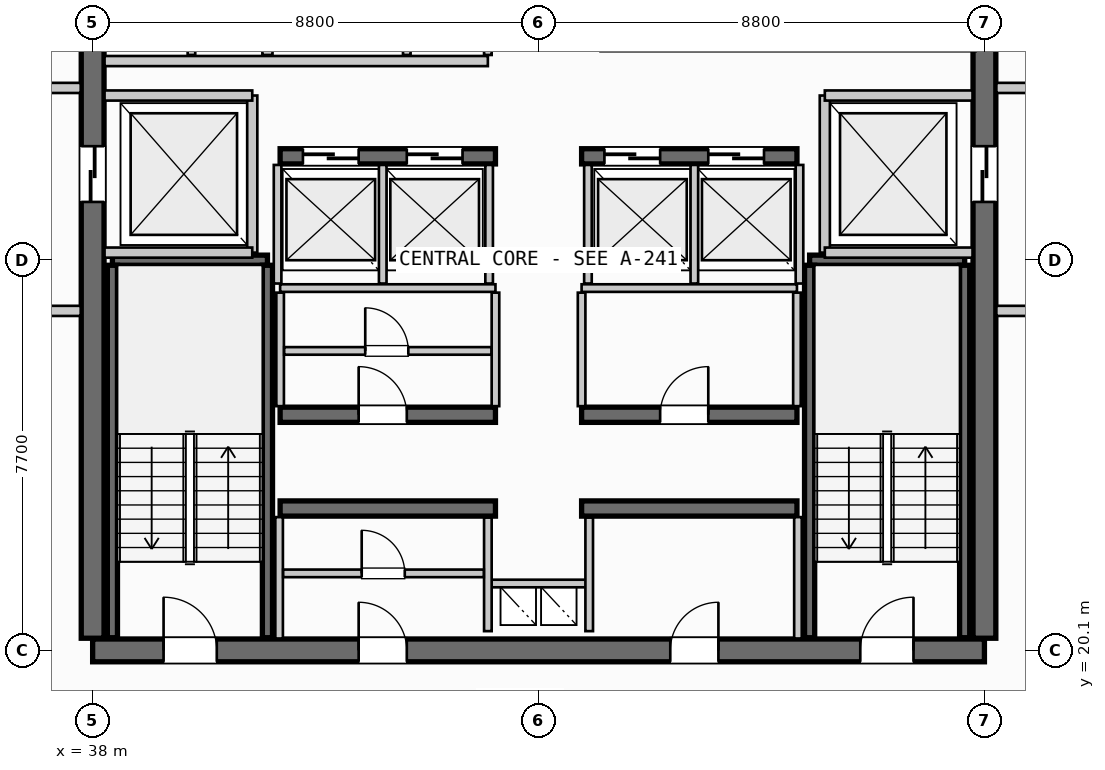
"""IFC4 building model, lengths in metres.
Left out: names, types, materials, properties, quantities, classifications, styles, units other than length and angle.
Written with IfcOpenShell. Run it as: python <this file> out.ifc"""

import sys

from ifc_helpers import new_model, si_unit, direction, frame, frame_2d, origin, place, context, subcontext, project, spatial, rectangle, extrude, source, transform, mapped, element, fill, save


model = new_model("IFC4")
c1 = context("Model", 3, precision=1e-05, world=origin(), true_north=direction((0.0, 1.0)))
c2 = subcontext(c1, "Body", "Model", "MODEL_VIEW")
j1 = project(units=[si_unit("LENGTHUNIT", "METRE"), si_unit("PLANEANGLEUNIT", "RADIAN")], contexts=[c1])
p1 = place(None, origin())
s1 = spatial("IfcSite", under=j1, at=p1, CompositionType="ELEMENT")
p2 = place(p1, origin())
s2 = spatial("IfcBuilding", under=s1, at=p2, CompositionType="ELEMENT")
p3 = place(p2, frame((0.0, 0.0, 293.95)))
s3 = spatial("IfcBuildingStorey", under=s2, at=p3, CompositionType="ELEMENT", Elevation=293.95)
p4 = place(p3, frame((38.0, 20.1, 0.0), z_axis=(0.0, 0.0, 1.0), x_axis=(1.0, 0.0, 0.0)))
e1 = element("IfcWall", 1, at=p4, inside=s3, PredefinedType="SHEAR", context=c2, shape_type="SweptSolid", body=[
    extrude(rectangle(XDim=17.6, YDim=0.45, at=frame_2d((8.8, 0.0))), origin(), (0.0, 0.0, 1.0), 3.21),
])
p5 = place(p4, frame((1.4, 0.0, 0.0)))
e2 = element("IfcOpeningElement", 2, at=p5, cuts=e1, PredefinedType="OPENING", context=c2, shape_type="SweptSolid", body=[
    extrude(rectangle(XDim=1.05, YDim=2.15, at=frame_2d((0.525, 1.075))), frame((0.0, 0.235, 0.0), z_axis=(0.0, -1.0, 0.0), x_axis=(1.0, 0.0, 0.0)), (0.0, 0.0, 1.0), 0.47),
])
p6 = place(p4, frame((15.15, 0.0, 0.0)))
e3 = element("IfcOpeningElement", 3, at=p6, cuts=e1, PredefinedType="OPENING", context=c2, shape_type="SweptSolid", body=[
    extrude(rectangle(XDim=1.05, YDim=2.15, at=frame_2d((0.525, 1.075))), frame((0.0, 0.235, 0.0), z_axis=(0.0, -1.0, 0.0), x_axis=(1.0, 0.0, 0.0)), (0.0, 0.0, 1.0), 0.47),
])
p7 = place(p4, frame((5.25, 0.0, 0.0)))
e4 = element("IfcOpeningElement", 4, at=p7, cuts=e1, PredefinedType="OPENING", context=c2, shape_type="SweptSolid", body=[
    extrude(rectangle(XDim=0.95, YDim=2.15, at=frame_2d((0.475, 1.075))), frame((0.0, 0.235, 0.0), z_axis=(0.0, -1.0, 0.0), x_axis=(1.0, 0.0, 0.0)), (0.0, 0.0, 1.0), 0.47),
])
p8 = place(p4, frame((11.4, 0.0, 0.0)))
e5 = element("IfcOpeningElement", 5, at=p8, cuts=e1, PredefinedType="OPENING", context=c2, shape_type="SweptSolid", body=[
    extrude(rectangle(XDim=0.95, YDim=2.15, at=frame_2d((0.475, 1.075))), frame((0.0, 0.235, 0.0), z_axis=(0.0, -1.0, 0.0), x_axis=(1.0, 0.0, 0.0)), (0.0, 0.0, 1.0), 0.47),
])
p9 = place(p3, frame((38.0, 35.26, 0.0), z_axis=(0.0, 0.0, 1.0), x_axis=(0.0, -1.0, 0.0)))
e6 = element("IfcWall", 6, at=p9, inside=s3, PredefinedType="SHEAR", context=c2, shape_type="SweptSolid", body=[
    extrude(rectangle(XDim=14.92, YDim=0.45, at=frame_2d((7.46, 0.0))), origin(), (0.0, 0.0, 1.0), 3.21),
])
p10 = place(p9, frame((5.21, 0.0, 0.0)))
e7 = element("IfcOpeningElement", 7, at=p10, cuts=e6, PredefinedType="OPENING", context=c2, shape_type="SweptSolid", body=[
    extrude(rectangle(XDim=1.1, YDim=2.2, at=frame_2d((0.55, 1.1))), frame((0.0, 0.235, 0.0), z_axis=(0.0, -1.0, 0.0), x_axis=(1.0, 0.0, 0.0)), (0.0, 0.0, 1.0), 0.47),
])
p11 = place(p3, frame((55.6, 20.34, 0.0), z_axis=(0.0, 0.0, 1.0), x_axis=(0.0, 1.0, 0.0)))
e8 = element("IfcWall", 8, at=p11, inside=s3, PredefinedType="SHEAR", context=c2, shape_type="SweptSolid", body=[
    extrude(rectangle(XDim=14.92, YDim=0.45, at=frame_2d((7.46, 0.0))), origin(), (0.0, 0.0, 1.0), 3.21),
])
p12 = place(p11, frame((12.71, 0.0, 0.0)))
e9 = element("IfcOpeningElement", 9, at=p12, cuts=e8, PredefinedType="OPENING", context=c2, shape_type="SweptSolid", body=[
    extrude(rectangle(XDim=1.05, YDim=2.15, at=frame_2d((0.525, 1.075))), frame((0.0, 0.235, 0.0), z_axis=(0.0, -1.0, 0.0), x_axis=(1.0, 0.0, 0.0)), (0.0, 0.0, 1.0), 0.47),
])
p13 = place(p11, frame((8.61, 0.0, 0.0)))
e10 = element("IfcOpeningElement", 10, at=p13, cuts=e8, PredefinedType="OPENING", context=c2, shape_type="SweptSolid", body=[
    extrude(rectangle(XDim=1.1, YDim=2.2, at=frame_2d((0.55, 1.1))), frame((0.0, 0.235, 0.0), z_axis=(0.0, -1.0, 0.0), x_axis=(1.0, 0.0, 0.0)), (0.0, 0.0, 1.0), 0.47),
])
for number, where, z_axis, x_axis in (
    (11, (41.7, 22.9, 0.0), (0.0, 0.0, 1.0), (1.0, 0.0, 0.0)),
    (12, (47.65, 22.9, 0.0), (0.0, 0.0, 1.0), (1.0, 0.0, 0.0)),
):
    element("IfcWall", number, at=place(p3, frame(where, z_axis=z_axis, x_axis=x_axis)), inside=s3, PredefinedType="SHEAR", context=c2, shape_type="SweptSolid", body=[
        extrude(rectangle(XDim=4.25, YDim=0.3, at=frame_2d((2.125, 0.0))), origin(), (0.0, 0.0, 1.0), 3.21),
    ])
p14 = place(p3, frame((41.7, 24.75, 0.0), z_axis=(0.0, 0.0, 1.0), x_axis=(1.0, 0.0, 0.0)))
e13 = element("IfcWall", 13, at=p14, inside=s3, PredefinedType="SHEAR", context=c2, shape_type="SweptSolid", body=[
    extrude(rectangle(XDim=4.25, YDim=0.3, at=frame_2d((2.125, 0.0))), origin(), (0.0, 0.0, 1.0), 3.21),
])
p15 = place(p14, frame((1.55, 0.0, 0.0)))
e14 = element("IfcOpeningElement", 14, at=p15, cuts=e13, PredefinedType="OPENING", context=c2, shape_type="SweptSolid", body=[
    extrude(rectangle(XDim=0.95, YDim=2.15, at=frame_2d((0.475, 1.075))), frame((0.0, 0.16, 0.0), z_axis=(0.0, -1.0, 0.0), x_axis=(1.0, 0.0, 0.0)), (0.0, 0.0, 1.0), 0.32),
])
p16 = place(p3, frame((47.65, 24.75, 0.0), z_axis=(0.0, 0.0, 1.0), x_axis=(1.0, 0.0, 0.0)))
e15 = element("IfcWall", 15, at=p16, inside=s3, PredefinedType="SHEAR", context=c2, shape_type="SweptSolid", body=[
    extrude(rectangle(XDim=4.25, YDim=0.3, at=frame_2d((2.125, 0.0))), origin(), (0.0, 0.0, 1.0), 3.21),
])
p17 = place(p16, frame((1.55, 0.0, 0.0)))
e16 = element("IfcOpeningElement", 16, at=p17, cuts=e15, PredefinedType="OPENING", context=c2, shape_type="SweptSolid", body=[
    extrude(rectangle(XDim=0.95, YDim=2.15, at=frame_2d((0.475, 1.075))), frame((0.0, 0.16, 0.0), z_axis=(0.0, -1.0, 0.0), x_axis=(1.0, 0.0, 0.0)), (0.0, 0.0, 1.0), 0.32),
])
p18 = place(p3, frame((41.7, 29.85, 0.0), z_axis=(0.0, 0.0, 1.0), x_axis=(1.0, 0.0, 0.0)))
e17 = element("IfcWall", 17, at=p18, inside=s3, PredefinedType="SHEAR", context=c2, shape_type="SweptSolid", body=[
    extrude(rectangle(XDim=4.25, YDim=0.3, at=frame_2d((2.125, 0.0))), origin(), (0.0, 0.0, 1.0), 3.21),
])
p19 = place(p18, frame((0.45, 0.0, 0.0)))
e18 = element("IfcOpeningElement", 18, at=p19, cuts=e17, PredefinedType="OPENING", context=c2, shape_type="SweptSolid", body=[
    extrude(rectangle(XDim=1.1, YDim=2.2, at=frame_2d((0.55, 1.1))), frame((0.0, 0.16, 0.0), z_axis=(0.0, -1.0, 0.0), x_axis=(1.0, 0.0, 0.0)), (0.0, 0.0, 1.0), 0.32),
])
p20 = place(p18, frame((2.5, 0.0, 0.0)))
e19 = element("IfcOpeningElement", 19, at=p20, cuts=e17, PredefinedType="OPENING", context=c2, shape_type="SweptSolid", body=[
    extrude(rectangle(XDim=1.1, YDim=2.2, at=frame_2d((0.55, 1.1))), frame((0.0, 0.16, 0.0), z_axis=(0.0, -1.0, 0.0), x_axis=(1.0, 0.0, 0.0)), (0.0, 0.0, 1.0), 0.32),
])
p21 = place(p3, frame((47.65, 29.85, 0.0), z_axis=(0.0, 0.0, 1.0), x_axis=(1.0, 0.0, 0.0)))
e20 = element("IfcWall", 20, at=p21, inside=s3, PredefinedType="SHEAR", context=c2, shape_type="SweptSolid", body=[
    extrude(rectangle(XDim=4.25, YDim=0.3, at=frame_2d((2.125, 0.0))), origin(), (0.0, 0.0, 1.0), 3.21),
])
p22 = place(p21, frame((0.45, 0.0, 0.0)))
e21 = element("IfcOpeningElement", 21, at=p22, cuts=e20, PredefinedType="OPENING", context=c2, shape_type="SweptSolid", body=[
    extrude(rectangle(XDim=1.1, YDim=2.2, at=frame_2d((0.55, 1.1))), frame((0.0, 0.16, 0.0), z_axis=(0.0, -1.0, 0.0), x_axis=(1.0, 0.0, 0.0)), (0.0, 0.0, 1.0), 0.32),
])
p23 = place(p21, frame((2.5, 0.0, 0.0)))
e22 = element("IfcOpeningElement", 22, at=p23, cuts=e20, PredefinedType="OPENING", context=c2, shape_type="SweptSolid", body=[
    extrude(rectangle(XDim=1.1, YDim=2.2, at=frame_2d((0.55, 1.1))), frame((0.0, 0.16, 0.0), z_axis=(0.0, -1.0, 0.0), x_axis=(1.0, 0.0, 0.0)), (0.0, 0.0, 1.0), 0.32),
])
p24 = place(p3, frame((38.39, 27.8, 0.0), z_axis=(0.0, 0.0, 1.0), x_axis=(1.0, 0.0, 0.0)))
e23 = element("IfcWall", 23, at=p24, inside=s3, PredefinedType="SHEAR", context=c2, shape_type="SweptSolid", body=[
    extrude(rectangle(XDim=3.06, YDim=0.2, at=frame_2d((1.53, 0.0))), origin(), (0.0, 0.0, 1.0), 3.21),
])
for number, where, z_axis, x_axis in (
    (24, (41.45, 27.7, 0.0), (0.0, 0.0, 1.0), (0.0, -1.0, 0.0)),
    (25, (38.39, 20.35, 0.0), (0.0, 0.0, 1.0), (0.0, 1.0, 0.0)),
):
    element("IfcWall", number, at=place(p3, frame(where, z_axis=z_axis, x_axis=x_axis)), inside=s3, PredefinedType="SHEAR", context=c2, shape_type="SweptSolid", body=[
        extrude(rectangle(XDim=7.35, YDim=0.2, at=frame_2d((3.675, 0.0))), origin(), (0.0, 0.0, 1.0), 3.21),
    ])
p25 = place(p3, frame((52.15, 27.8, 0.0), z_axis=(0.0, 0.0, 1.0), x_axis=(1.0, 0.0, 0.0)))
e26 = element("IfcWall", 26, at=p25, inside=s3, PredefinedType="SHEAR", context=c2, shape_type="SweptSolid", body=[
    extrude(rectangle(XDim=3.06, YDim=0.2, at=frame_2d((1.53, 0.0))), origin(), (0.0, 0.0, 1.0), 3.21),
])
for number, where, z_axis, x_axis in (
    (27, (55.21, 27.7, 0.0), (0.0, 0.0, 1.0), (0.0, -1.0, 0.0)),
    (28, (52.15, 20.35, 0.0), (0.0, 0.0, 1.0), (0.0, 1.0, 0.0)),
):
    element("IfcWall", number, at=place(p3, frame(where, z_axis=z_axis, x_axis=x_axis)), inside=s3, PredefinedType="SHEAR", context=c2, shape_type="SweptSolid", body=[
        extrude(rectangle(XDim=7.35, YDim=0.2, at=frame_2d((3.675, 0.0))), origin(), (0.0, 0.0, 1.0), 3.21),
    ])
p26 = place(p3, frame((45.8, 21.42, 0.0), z_axis=(0.0, 0.0, 1.0), x_axis=(1.0, 0.0, 0.0)))
e29 = element("IfcWall", 29, at=p26, inside=s3, PredefinedType="PARTITIONING", context=c2, shape_type="SweptSolid", body=[
    extrude(rectangle(XDim=2.0, YDim=0.15, at=frame_2d((1.0, 0.0))), origin(), (0.0, 0.0, 1.0), 2.315),
])
for number, where, z_axis, x_axis in (
    (30, (45.8, 20.48, 0.0), (0.0, 0.0, 1.0), (0.0, 1.0, 0.0)),
    (31, (47.8, 20.48, 0.0), (0.0, 0.0, 1.0), (0.0, 1.0, 0.0)),
):
    element("IfcWall", number, at=place(p3, frame(where, z_axis=z_axis, x_axis=x_axis)), inside=s3, PredefinedType="PARTITIONING", context=c2, shape_type="SweptSolid", body=[
        extrude(rectangle(XDim=2.24, YDim=0.15, at=frame_2d((1.12, 0.0))), origin(), (0.0, 0.0, 1.0), 2.315),
    ])
p27 = place(p3, frame((41.15, 27.95, 0.0), z_axis=(0.0, 0.0, 1.0), x_axis=(0.0, 1.0, 0.0)))
e32 = element("IfcWall", 32, at=p27, inside=s3, PredefinedType="PARTITIONING", context=c2, shape_type="SweptSolid", body=[
    extrude(rectangle(XDim=3.1, YDim=0.2, at=frame_2d((1.55, 0.0))), origin(), (0.0, 0.0, 1.0), 2.315),
])
for number, where, z_axis, x_axis in (
    (33, (38.235, 27.95, 0.0), (0.0, 0.0, 1.0), (1.0, 0.0, 0.0)),
    (34, (38.235, 31.05, 0.0), (0.0, 0.0, 1.0), (1.0, 0.0, 0.0)),
):
    element("IfcWall", number, at=place(p3, frame(where, z_axis=z_axis, x_axis=x_axis)), inside=s3, PredefinedType="PARTITIONING", context=c2, shape_type="SweptSolid", body=[
        extrude(rectangle(XDim=2.915, YDim=0.2, at=frame_2d((1.458, 0.0))), origin(), (0.0, 0.0, 1.0), 2.315),
    ])
for number, where, z_axis, x_axis in (
    (35, (34.5, 26.8, 0.0), (0.0, 0.0, 1.0), (1.0, 0.0, 0.0)),
    (36, (34.5, 31.2, 0.0), (0.0, 0.0, 1.0), (1.0, 0.0, 0.0)),
):
    element("IfcWall", number, at=place(p3, frame(where, z_axis=z_axis, x_axis=x_axis)), inside=s3, PredefinedType="PARTITIONING", context=c2, shape_type="SweptSolid", body=[
        extrude(rectangle(XDim=3.265, YDim=0.2, at=frame_2d((1.632, 0.0))), origin(), (0.0, 0.0, 1.0), 2.315),
    ])
p28 = place(p3, frame((52.45, 27.95, 0.0), z_axis=(0.0, 0.0, 1.0), x_axis=(0.0, 1.0, 0.0)))
e37 = element("IfcWall", 37, at=p28, inside=s3, PredefinedType="PARTITIONING", context=c2, shape_type="SweptSolid", body=[
    extrude(rectangle(XDim=3.1, YDim=0.2, at=frame_2d((1.55, 0.0))), origin(), (0.0, 0.0, 1.0), 2.315),
])
for number, where, z_axis, x_axis in (
    (38, (52.45, 27.95, 0.0), (0.0, 0.0, 1.0), (1.0, 0.0, 0.0)),
    (39, (52.45, 31.05, 0.0), (0.0, 0.0, 1.0), (1.0, 0.0, 0.0)),
):
    element("IfcWall", number, at=place(p3, frame(where, z_axis=z_axis, x_axis=x_axis)), inside=s3, PredefinedType="PARTITIONING", context=c2, shape_type="SweptSolid", body=[
        extrude(rectangle(XDim=2.915, YDim=0.2, at=frame_2d((1.458, 0.0))), origin(), (0.0, 0.0, 1.0), 2.315),
    ])
for number, where, z_axis, x_axis in (
    (40, (55.835, 26.8, 0.0), (0.0, 0.0, 1.0), (1.0, 0.0, 0.0)),
    (41, (55.835, 31.2, 0.0), (0.0, 0.0, 1.0), (1.0, 0.0, 0.0)),
):
    element("IfcWall", number, at=place(p3, frame(where, z_axis=z_axis, x_axis=x_axis)), inside=s3, PredefinedType="PARTITIONING", context=c2, shape_type="SweptSolid", body=[
        extrude(rectangle(XDim=3.265, YDim=0.2, at=frame_2d((1.633, 0.0))), origin(), (0.0, 0.0, 1.0), 2.315),
    ])
for number, where, z_axis, x_axis in (
    (42, (41.68, 20.335, 0.0), (0.0, 0.0, 1.0), (0.0, 1.0, 0.0)),
    (43, (51.92, 20.335, 0.0), (0.0, 0.0, 1.0), (0.0, 1.0, 0.0)),
):
    element("IfcWall", number, at=place(p3, frame(where, z_axis=z_axis, x_axis=x_axis)), inside=s3, PredefinedType="PARTITIONING", context=c2, shape_type="SweptSolid", body=[
        extrude(rectangle(XDim=2.395, YDim=0.15, at=frame_2d((1.198, 0.0))), origin(), (0.0, 0.0, 1.0), 2.315),
    ])
p29 = place(p3, frame((41.76, 21.62, 0.0), z_axis=(0.0, 0.0, 1.0), x_axis=(1.0, 0.0, 0.0)))
e44 = element("IfcWall", 44, at=p29, inside=s3, PredefinedType="PARTITIONING", context=c2, shape_type="SweptSolid", body=[
    extrude(rectangle(XDim=3.96, YDim=0.15, at=frame_2d((1.98, 0.0))), origin(), (0.0, 0.0, 1.0), 2.315),
])
p30 = place(p29, frame((1.55, 0.0, 0.0)))
e45 = element("IfcOpeningElement", 45, at=p30, cuts=e44, PredefinedType="OPENING", context=c2, shape_type="SweptSolid", body=[
    extrude(rectangle(XDim=0.85, YDim=2.15, at=frame_2d((0.425, 1.075))), frame((0.0, 0.085, 0.0), z_axis=(0.0, -1.0, 0.0), x_axis=(1.0, 0.0, 0.0)), (0.0, 0.0, 1.0), 0.17),
])
for number, where, z_axis, x_axis in (
    (46, (41.7, 27.25, 0.0), (0.0, 0.0, 1.0), (1.0, 0.0, 0.0)),
    (47, (47.65, 27.25, 0.0), (0.0, 0.0, 1.0), (1.0, 0.0, 0.0)),
):
    element("IfcWall", number, at=place(p3, frame(where, z_axis=z_axis, x_axis=x_axis)), inside=s3, PredefinedType="PARTITIONING", context=c2, shape_type="SweptSolid", body=[
        extrude(rectangle(XDim=4.25, YDim=0.15, at=frame_2d((2.125, 0.0))), origin(), (0.0, 0.0, 1.0), 2.315),
    ])
for number, where, z_axis, x_axis in (
    (48, (41.7, 24.92, 0.0), (0.0, 0.0, 1.0), (0.0, 1.0, 0.0)),
    (49, (45.95, 24.92, 0.0), (0.0, 0.0, 1.0), (0.0, 1.0, 0.0)),
    (50, (47.65, 24.92, 0.0), (0.0, 0.0, 1.0), (0.0, 1.0, 0.0)),
    (51, (51.9, 24.92, 0.0), (0.0, 0.0, 1.0), (0.0, 1.0, 0.0)),
):
    element("IfcWall", number, at=place(p3, frame(where, z_axis=z_axis, x_axis=x_axis)), inside=s3, PredefinedType="PARTITIONING", context=c2, shape_type="SweptSolid", body=[
        extrude(rectangle(XDim=2.24, YDim=0.15, at=frame_2d((1.12, 0.0))), origin(), (0.0, 0.0, 1.0), 2.315),
    ])
p31 = place(p3, frame((41.78, 26.01, 0.0), z_axis=(0.0, 0.0, 1.0), x_axis=(1.0, 0.0, 0.0)))
e52 = element("IfcWall", 52, at=p31, inside=s3, PredefinedType="PARTITIONING", context=c2, shape_type="SweptSolid", body=[
    extrude(rectangle(XDim=4.09, YDim=0.15, at=frame_2d((2.045, 0.0))), origin(), (0.0, 0.0, 1.0), 2.315),
])
p32 = place(p31, frame((1.6, 0.0, 0.0)))
e53 = element("IfcOpeningElement", 53, at=p32, cuts=e52, PredefinedType="OPENING", context=c2, shape_type="SweptSolid", body=[
    extrude(rectangle(XDim=0.85, YDim=2.15, at=frame_2d((0.425, 1.075))), frame((0.0, 0.085, 0.0), z_axis=(0.0, -1.0, 0.0), x_axis=(1.0, 0.0, 0.0)), (0.0, 0.0, 1.0), 0.17),
])
for number, where, z_axis, x_axis in (
    (54, (41.65, 27.34, 0.0), (0.0, 0.0, 1.0), (0.0, 1.0, 0.0)),
    (55, (43.725, 27.34, 0.0), (0.0, 0.0, 1.0), (0.0, 1.0, 0.0)),
    (56, (45.825, 27.34, 0.0), (0.0, 0.0, 1.0), (0.0, 1.0, 0.0)),
    (57, (47.775, 27.34, 0.0), (0.0, 0.0, 1.0), (0.0, 1.0, 0.0)),
    (58, (49.875, 27.34, 0.0), (0.0, 0.0, 1.0), (0.0, 1.0, 0.0)),
    (59, (51.95, 27.34, 0.0), (0.0, 0.0, 1.0), (0.0, 1.0, 0.0)),
):
    element("IfcWall", number, at=place(p3, frame(where, z_axis=z_axis, x_axis=x_axis)), inside=s3, PredefinedType="PARTITIONING", context=c2, shape_type="SweptSolid", body=[
        extrude(rectangle(XDim=2.34, YDim=0.15, at=frame_2d((1.17, 0.0))), origin(), (0.0, 0.0, 1.0), 2.315),
    ])
p33 = place(p3, frame((41.45, 31.85, 0.0), z_axis=(0.0, 0.0, 1.0), x_axis=(0.0, 1.0, 0.0)))
e60 = element("IfcWall", 60, at=p33, inside=s3, PredefinedType="PARTITIONING", context=c2, shape_type="SweptSolid", body=[
    extrude(rectangle(XDim=3.415, YDim=0.2, at=frame_2d((1.708, 0.0))), origin(), (0.0, 0.0, 1.0), 2.315),
])
p34 = place(p3, frame((38.235, 31.73, 0.0), z_axis=(0.0, 0.0, 1.0), x_axis=(1.0, 0.0, 0.0)))
e61 = element("IfcWall", 61, at=p34, inside=s3, PredefinedType="PARTITIONING", context=c2, shape_type="SweptSolid", body=[
    extrude(rectangle(XDim=7.565, YDim=0.2, at=frame_2d((3.782, 0.0))), origin(), (0.0, 0.0, 1.0), 2.315),
])
for number, where, z_axis, x_axis in (
    (62, (45.8, 31.85, 0.0), (0.0, 0.0, 1.0), (0.0, 1.0, 0.0)),
    (63, (39.95, 31.85, 0.0), (0.0, 0.0, 1.0), (0.0, 1.0, 0.0)),
):
    element("IfcWall", number, at=place(p3, frame(where, z_axis=z_axis, x_axis=x_axis)), inside=s3, PredefinedType="PARTITIONING", context=c2, shape_type="SweptSolid", body=[
        extrude(rectangle(XDim=3.415, YDim=0.15, at=frame_2d((1.708, 0.0))), origin(), (0.0, 0.0, 1.0), 2.315),
    ])
p35 = place(p3, frame((44.2, 31.85, 0.0), z_axis=(0.0, 0.0, 1.0), x_axis=(0.0, 1.0, 0.0)))
e64 = element("IfcWall", 64, at=p35, inside=s3, PredefinedType="PLUMBINGWALL", context=c2, shape_type="SweptSolid", body=[
    extrude(rectangle(XDim=3.415, YDim=0.15, at=frame_2d((1.708, 0.0))), origin(), (0.0, 0.0, 1.0), 2.315),
])
m1 = source(origin(), c2, "Body", "SweptSolid", [
    extrude(rectangle(XDim=1.05, YDim=2.15, at=frame_2d((0.525, 1.075))), frame((0.0, 0.025, 0.0), z_axis=(0.0, -1.0, 0.0), x_axis=(1.0, 0.0, 0.0)), (0.0, 0.0, 1.0), 0.05),
])
p36 = place(p5, origin())
e65 = element("IfcDoor", 65, at=p36, inside=s3, OperationType="SINGLE_SWING_LEFT", PredefinedType="DOOR", context=c2, shape_type="MappedRepresentation", body=[
    mapped(m1, transform((0.0, 0.0, 0.0), scale=1.0)),
])
fill(e2, e65)
p37 = place(p6, origin())
e66 = element("IfcDoor", 66, at=p37, inside=s3, OperationType="SINGLE_SWING_RIGHT", PredefinedType="DOOR", context=c2, shape_type="MappedRepresentation", body=[
    mapped(m1, transform((0.0, 0.0, 0.0), scale=1.0)),
])
fill(e3, e66)
m2 = source(origin(), c2, "Body", "SweptSolid", [
    extrude(rectangle(XDim=1.1, YDim=2.2, at=frame_2d((0.55, 1.1))), frame((0.0, 0.025, 0.0), z_axis=(0.0, -1.0, 0.0), x_axis=(1.0, 0.0, 0.0)), (0.0, 0.0, 1.0), 0.05),
])
p38 = place(p10, origin())
e67 = element("IfcDoor", 67, at=p38, inside=s3, OperationType="SLIDING_TO_LEFT", PredefinedType="DOOR", context=c2, shape_type="MappedRepresentation", body=[
    mapped(m2, transform((0.0, 0.0, 0.0), scale=1.0)),
])
fill(e7, e67)
p39 = place(p13, origin())
e68 = element("IfcDoor", 68, at=p39, inside=s3, OperationType="SLIDING_TO_RIGHT", PredefinedType="DOOR", context=c2, shape_type="MappedRepresentation", body=[
    mapped(m2, transform((0.0, 0.0, 0.0), scale=1.0)),
])
fill(e10, e68)
m3 = source(origin(), c2, "Body", "SweptSolid", [
    extrude(rectangle(XDim=0.95, YDim=2.15, at=frame_2d((0.475, 1.075))), frame((0.0, 0.025, 0.0), z_axis=(0.0, -1.0, 0.0), x_axis=(1.0, 0.0, 0.0)), (0.0, 0.0, 1.0), 0.05),
])
p40 = place(p7, origin())
e69 = element("IfcDoor", 69, at=p40, inside=s3, OperationType="SINGLE_SWING_LEFT", PredefinedType="DOOR", context=c2, shape_type="MappedRepresentation", body=[
    mapped(m3, transform((0.0, 0.0, 0.0), scale=1.0)),
])
fill(e4, e69)
p41 = place(p8, origin())
e70 = element("IfcDoor", 70, at=p41, inside=s3, OperationType="SINGLE_SWING_RIGHT", PredefinedType="DOOR", context=c2, shape_type="MappedRepresentation", body=[
    mapped(m3, transform((0.0, 0.0, 0.0), scale=1.0)),
])
fill(e5, e70)
p42 = place(p15, origin())
e71 = element("IfcDoor", 71, at=p42, inside=s3, OperationType="SINGLE_SWING_LEFT", PredefinedType="DOOR", context=c2, shape_type="MappedRepresentation", body=[
    mapped(m3, transform((0.0, 0.0, 0.0), scale=1.0)),
])
fill(e14, e71)
p43 = place(p17, origin())
e72 = element("IfcDoor", 72, at=p43, inside=s3, OperationType="SINGLE_SWING_RIGHT", PredefinedType="DOOR", context=c2, shape_type="MappedRepresentation", body=[
    mapped(m3, transform((0.0, 0.0, 0.0), scale=1.0)),
])
fill(e16, e72)
p44 = place(p19, origin())
e73 = element("IfcDoor", 73, at=p44, inside=s3, OperationType="SLIDING_TO_LEFT", PredefinedType="DOOR", context=c2, shape_type="MappedRepresentation", body=[
    mapped(m2, transform((0.0, 0.0, 0.0), scale=1.0)),
])
fill(e18, e73)
p45 = place(p20, origin())
e74 = element("IfcDoor", 74, at=p45, inside=s3, OperationType="SLIDING_TO_LEFT", PredefinedType="DOOR", context=c2, shape_type="MappedRepresentation", body=[
    mapped(m2, transform((0.0, 0.0, 0.0), scale=1.0)),
])
fill(e19, e74)
p46 = place(p22, origin())
e75 = element("IfcDoor", 75, at=p46, inside=s3, OperationType="SLIDING_TO_LEFT", PredefinedType="DOOR", context=c2, shape_type="MappedRepresentation", body=[
    mapped(m2, transform((0.0, 0.0, 0.0), scale=1.0)),
])
fill(e21, e75)
p47 = place(p23, origin())
e76 = element("IfcDoor", 76, at=p47, inside=s3, OperationType="SLIDING_TO_LEFT", PredefinedType="DOOR", context=c2, shape_type="MappedRepresentation", body=[
    mapped(m2, transform((0.0, 0.0, 0.0), scale=1.0)),
])
fill(e22, e76)
m4 = source(origin(), c2, "Body", "SweptSolid", [
    extrude(rectangle(XDim=0.85, YDim=2.15, at=frame_2d((0.425, 1.075))), frame((0.0, 0.025, 0.0), z_axis=(0.0, -1.0, 0.0), x_axis=(1.0, 0.0, 0.0)), (0.0, 0.0, 1.0), 0.05),
])
p48 = place(p30, origin())
e77 = element("IfcDoor", 77, at=p48, inside=s3, OperationType="SINGLE_SWING_LEFT", PredefinedType="DOOR", context=c2, shape_type="MappedRepresentation", body=[
    mapped(m4, transform((0.0, 0.0, 0.0), scale=1.0)),
])
fill(e45, e77)
p49 = place(p32, origin())
e78 = element("IfcDoor", 78, at=p49, inside=s3, OperationType="SINGLE_SWING_LEFT", PredefinedType="DOOR", context=c2, shape_type="MappedRepresentation", body=[
    mapped(m4, transform((0.0, 0.0, 0.0), scale=1.0)),
])
fill(e53, e78)
save(model, sys.argv[1])
